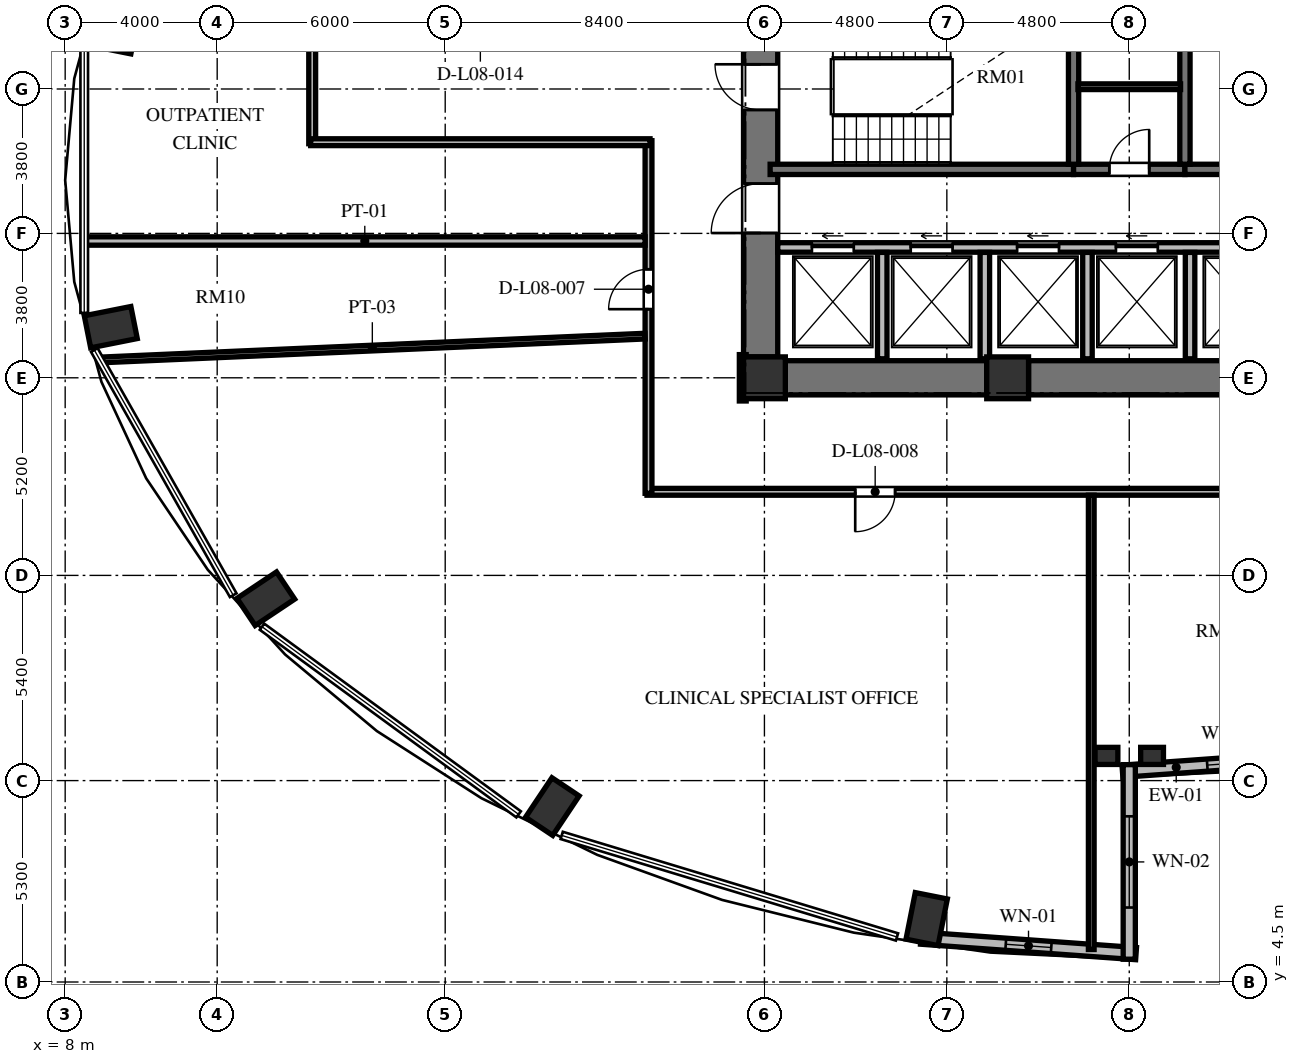
"""IFC4 building model, lengths in metres.
Left out: names, types, materials, properties, quantities, classifications, styles, units other than length and angle.
Written with IfcOpenShell. Run it as: python <this file> out.ifc"""

import sys

from ifc_helpers import new_model, si_unit, direction, frame, frame_2d, origin, origin_2d, place, context, subcontext, project, spatial, rectangle, extrude, element, fill, save


model = new_model("IFC4")
c1 = context("Model", 3, precision=1e-05, world=origin(), true_north=direction((0.0, 1.0)))
c2 = subcontext(c1, "Body", "Model", "MODEL_VIEW")
j1 = project(units=[si_unit("LENGTHUNIT", "METRE"), si_unit("PLANEANGLEUNIT", "RADIAN")], contexts=[c1])
p1 = place(None, origin())
s1 = spatial("IfcSite", under=j1, at=p1, CompositionType="ELEMENT")
p2 = place(p1, origin())
s2 = spatial("IfcBuilding", under=s1, at=p2, CompositionType="ELEMENT")
p3 = place(p2, frame((0.0, 0.0, 36.144)))
s3 = spatial("IfcBuildingStorey", under=s2, at=p3, CompositionType="ELEMENT", Elevation=36.144)
for number, where, z_axis, x_axis in (
    (1, (9.2, 29.468, 0.0), (0.0, 0.0, 1.0), (-0.981, 0.195, 0.0)),
    (2, (9.2, 21.732, 0.0), (0.0, 0.0, 1.0), (-0.981, -0.195, 0.0)),
    (3, (13.28, 14.586, 0.0), (0.0, 0.0, 1.0), (-0.831, -0.556, 0.0)),
    (4, (20.819, 9.116, 0.0), (0.0, 0.0, 1.0), (-0.556, -0.831, 0.0)),
    (5, (30.669, 6.156, 0.0), (0.0, 0.0, 1.0), (-0.195, -0.981, 0.0)),
):
    element("IfcColumn", number, at=place(p3, frame(where, z_axis=z_axis, x_axis=x_axis)), inside=s3, PredefinedType="COLUMN", context=c2, shape_type="SweptSolid", body=[
        extrude(rectangle(XDim=1.25, YDim=0.86, at=origin_2d()), origin(), (0.0, 0.0, 1.0), 3.648),
    ])
for number, where, z_axis, x_axis in (
    (6, (26.4, 20.4, 0.0), (0.0, 0.0, 1.0), (1.0, 0.0, 0.0)),
    (7, (32.8, 20.4, 0.0), (0.0, 0.0, 1.0), (1.0, 0.0, 0.0)),
):
    element("IfcColumn", number, at=place(p3, frame(where, z_axis=z_axis, x_axis=x_axis)), inside=s3, PredefinedType="COLUMN", context=c2, shape_type="SweptSolid", body=[
        extrude(rectangle(XDim=1.1, YDim=1.1, at=origin_2d()), origin(), (0.0, 0.0, 1.0), 3.648),
    ])
for number, where, z_axis, x_axis in (
    (8, (35.4, 10.45, 0.0), (0.0, 0.0, 1.0), (1.0, 0.0, 0.0)),
    (9, (36.6, 10.45, 0.0), (0.0, 0.0, 1.0), (1.0, 0.0, 0.0)),
):
    element("IfcColumn", number, at=place(p3, frame(where, z_axis=z_axis, x_axis=x_axis)), inside=s3, PredefinedType="PILASTER", context=c2, shape_type="SweptSolid", body=[
        extrude(rectangle(XDim=0.6, YDim=0.45, at=origin_2d()), origin(), (0.0, 0.0, 1.0), 3.648),
    ])
p4 = place(p3, frame((26.3, 20.95, 0.0), z_axis=(0.0, 0.0, 1.0), x_axis=(0.0, 1.0, 0.0)))
e10 = element("IfcWall", 10, at=p4, inside=s3, PredefinedType="SHEAR", context=c2, shape_type="SweptSolid", body=[
    extrude(rectangle(XDim=14.1, YDim=0.9, at=frame_2d((7.05, 0.0))), origin(), (0.0, 0.0, 1.0), 3.648),
])
p5 = place(p4, frame((6.5, 0.0, 0.0)))
e11 = element("IfcOpeningElement", 11, at=p5, cuts=e10, PredefinedType="OPENING", context=c2, shape_type="SweptSolid", body=[
    extrude(rectangle(XDim=1.2, YDim=2.15, at=frame_2d((0.6, 1.075))), frame((0.0, 0.46, 0.0), z_axis=(0.0, -1.0, 0.0), x_axis=(1.0, 0.0, 0.0)), (0.0, 0.0, 1.0), 0.92),
])
p6 = place(p4, frame((9.6, 0.0, 0.0)))
e12 = element("IfcOpeningElement", 12, at=p6, cuts=e10, PredefinedType="OPENING", context=c2, shape_type="SweptSolid", body=[
    extrude(rectangle(XDim=1.3, YDim=2.2, at=frame_2d((0.65, 1.1))), frame((0.0, 0.46, 0.0), z_axis=(0.0, -1.0, 0.0), x_axis=(1.0, 0.0, 0.0)), (0.0, 0.0, 1.0), 0.92),
])
p7 = place(p4, frame((3.26, 0.0, 0.0)))
e13 = element("IfcOpeningElement", 13, at=p7, cuts=e10, PredefinedType="OPENING", context=c2, shape_type="SweptSolid", body=[
    extrude(rectangle(XDim=1.3, YDim=2.2, at=frame_2d((0.65, 1.1))), frame((0.0, 0.46, 0.0), z_axis=(0.0, -1.0, 0.0), x_axis=(1.0, 0.0, 0.0)), (0.0, 0.0, 1.0), 0.92),
])
p8 = place(p3, frame((26.95, 20.4, 0.0), z_axis=(0.0, 0.0, 1.0), x_axis=(1.0, 0.0, 0.0)))
e14 = element("IfcWall", 14, at=p8, inside=s3, PredefinedType="SHEAR", context=c2, shape_type="SweptSolid", body=[
    extrude(rectangle(XDim=5.3, YDim=0.9, at=frame_2d((2.65, 0.0))), origin(), (0.0, 0.0, 1.0), 3.648),
])
p9 = place(p3, frame((33.35, 20.4, 0.0), z_axis=(0.0, 0.0, 1.0), x_axis=(1.0, 0.0, 0.0)))
e15 = element("IfcWall", 15, at=p9, inside=s3, PredefinedType="SHEAR", context=c2, shape_type="SweptSolid", body=[
    extrude(rectangle(XDim=5.3, YDim=0.9, at=frame_2d((2.65, 0.0))), origin(), (0.0, 0.0, 1.0), 3.648),
])
p10 = place(p3, frame((35.821, 10.047, 0.0), z_axis=(0.0, 0.0, 1.0), x_axis=(0.997422321809, 0.071754525696, 0.0)))
e16 = element("IfcWall", 16, at=p10, inside=s3, PredefinedType="SOLIDWALL", context=c2, shape_type="SweptSolid", body=[
    extrude(rectangle(XDim=5.675, YDim=0.32, at=frame_2d((2.838, 0.0))), origin(), (0.0, 0.0, 1.0), 3.428),
])
p11 = place(p10, frame((2.238, 0.0, 0.85)))
e17 = element("IfcOpeningElement", 17, at=p11, cuts=e16, PredefinedType="OPENING", context=c2, shape_type="SweptSolid", body=[
    extrude(rectangle(XDim=1.2, YDim=1.8, at=frame_2d((0.6, 0.9))), frame((0.0, 0.17, 0.0), z_axis=(0.0, -1.0, 0.0), x_axis=(1.0, 0.0, 0.0)), (0.0, 0.0, 1.0), 0.34),
])
p12 = place(p3, frame((30.519, 5.654, 0.0), z_axis=(0.0, 0.0, 1.0), x_axis=(0.997421878774, -0.071760683825, 0.0)))
e18 = element("IfcWall", 18, at=p12, inside=s3, PredefinedType="SOLIDWALL", context=c2, shape_type="SweptSolid", body=[
    extrude(rectangle(XDim=5.675, YDim=0.32, at=frame_2d((2.837, 0.0))), origin(), (0.0, 0.0, 1.0), 3.428),
])
p13 = place(p12, frame((2.237, 0.0, 0.85)))
e19 = element("IfcOpeningElement", 19, at=p13, cuts=e18, PredefinedType="OPENING", context=c2, shape_type="SweptSolid", body=[
    extrude(rectangle(XDim=1.2, YDim=2.2, at=frame_2d((0.6, 1.1))), frame((0.0, 0.17, 0.0), z_axis=(0.0, -1.0, 0.0), x_axis=(1.0, 0.0, 0.0)), (0.0, 0.0, 1.0), 0.34),
])
p14 = place(p3, frame((36.0, 5.1, 0.0), z_axis=(0.0, 0.0, 1.0), x_axis=(0.0, 1.0, 0.0)))
e20 = element("IfcWall", 20, at=p14, inside=s3, PredefinedType="SOLIDWALL", context=c2, shape_type="SweptSolid", body=[
    extrude(rectangle(XDim=5.12, YDim=0.32, at=frame_2d((2.56, 0.0))), origin(), (0.0, 0.0, 1.0), 3.428),
])
p15 = place(p14, frame((1.36, 0.0, 0.84)))
e21 = element("IfcOpeningElement", 21, at=p15, cuts=e20, PredefinedType="OPENING", context=c2, shape_type="SweptSolid", body=[
    extrude(rectangle(XDim=2.4, YDim=2.04, at=frame_2d((1.2, 1.02))), frame((0.0, 0.17, 0.0), z_axis=(0.0, -1.0, 0.0), x_axis=(1.0, 0.0, 0.0)), (0.0, 0.0, 1.0), 0.34),
])
p16 = place(p3, frame((26.55, 25.885, 0.0), z_axis=(0.0, 0.0, 1.0), x_axis=(1.0, 0.0, 0.0)))
e22 = element("IfcWall", 22, at=p16, inside=s3, PredefinedType="SHEAR", context=c2, shape_type="SweptSolid", body=[
    extrude(rectangle(XDim=7.985, YDim=0.27, at=frame_2d((3.992, 0.0))), origin(), (0.0, 0.0, 1.0), 3.648),
])
p17 = place(p3, frame((34.535, 25.885, 0.0), z_axis=(0.0, 0.0, 1.0), x_axis=(1.0, 0.0, 0.0)))
e23 = element("IfcWall", 23, at=p17, inside=s3, PredefinedType="SHEAR", context=c2, shape_type="SweptSolid", body=[
    extrude(rectangle(XDim=2.93, YDim=0.27, at=frame_2d((1.465, 0.0))), origin(), (0.0, 0.0, 1.0), 3.648),
])
p18 = place(p17, frame((0.94, 0.0, 0.0)))
e24 = element("IfcOpeningElement", 24, at=p18, cuts=e23, PredefinedType="OPENING", context=c2, shape_type="SweptSolid", body=[
    extrude(rectangle(XDim=1.05, YDim=2.15, at=frame_2d((0.525, 1.075))), frame((0.0, 0.145, 0.0), z_axis=(0.0, -1.0, 0.0), x_axis=(1.0, 0.0, 0.0)), (0.0, 0.0, 1.0), 0.29),
])
p19 = place(p3, frame((37.465, 25.885, 0.0), z_axis=(0.0, 0.0, 1.0), x_axis=(1.0, 0.0, 0.0)))
e25 = element("IfcWall", 25, at=p19, inside=s3, PredefinedType="SHEAR", context=c2, shape_type="SweptSolid", body=[
    extrude(rectangle(XDim=7.985, YDim=0.27, at=frame_2d((3.992, 0.0))), origin(), (0.0, 0.0, 1.0), 3.648),
])
for number, where, z_axis, x_axis in (
    (26, (34.535, 26.02, 0.0), (0.0, 0.0, 1.0), (0.0, 1.0, 0.0)),
    (27, (37.465, 26.02, 0.0), (0.0, 0.0, 1.0), (0.0, 1.0, 0.0)),
):
    element("IfcWall", number, at=place(p3, frame(where, z_axis=z_axis, x_axis=x_axis)), inside=s3, PredefinedType="SHEAR", context=c2, shape_type="SweptSolid", body=[
        extrude(rectangle(XDim=4.08, YDim=0.27, at=frame_2d((2.04, 0.0))), origin(), (0.0, 0.0, 1.0), 3.648),
    ])
p20 = place(p3, frame((34.65, 28.06, 0.0), z_axis=(0.0, 0.0, 1.0), x_axis=(1.0, 0.0, 0.0)))
e28 = element("IfcWall", 28, at=p20, inside=s3, PredefinedType="PARTITIONING", context=c2, shape_type="SweptSolid", body=[
    extrude(rectangle(XDim=2.7, YDim=0.15, at=frame_2d((1.35, 0.0))), origin(), (0.0, 0.0, 1.0), 3.428),
])
p21 = place(p3, frame((26.75, 23.83, 0.0), z_axis=(0.0, 0.0, 1.0), x_axis=(1.0, 0.0, 0.0)))
e29 = element("IfcWall", 29, at=p21, inside=s3, PredefinedType="SOLIDWALL", context=c2, shape_type="SweptSolid", body=[
    extrude(rectangle(XDim=16.2, YDim=0.25, at=frame_2d((8.1, 0.0))), origin(), (0.0, 0.0, 1.0), 3.428),
])
p22 = place(p21, frame((0.9, 0.0, 0.0)))
e30 = element("IfcOpeningElement", 30, at=p22, cuts=e29, PredefinedType="OPENING", context=c2, shape_type="SweptSolid", body=[
    extrude(rectangle(XDim=1.1, YDim=2.2, at=frame_2d((0.55, 1.1))), frame((0.0, 0.135, 0.0), z_axis=(0.0, -1.0, 0.0), x_axis=(1.0, 0.0, 0.0)), (0.0, 0.0, 1.0), 0.27),
])
p23 = place(p21, frame((3.5, 0.0, 0.0)))
e31 = element("IfcOpeningElement", 31, at=p23, cuts=e29, PredefinedType="OPENING", context=c2, shape_type="SweptSolid", body=[
    extrude(rectangle(XDim=1.1, YDim=2.2, at=frame_2d((0.55, 1.1))), frame((0.0, 0.135, 0.0), z_axis=(0.0, -1.0, 0.0), x_axis=(1.0, 0.0, 0.0)), (0.0, 0.0, 1.0), 0.27),
])
p24 = place(p21, frame((6.3, 0.0, 0.0)))
e32 = element("IfcOpeningElement", 32, at=p24, cuts=e29, PredefinedType="OPENING", context=c2, shape_type="SweptSolid", body=[
    extrude(rectangle(XDim=1.1, YDim=2.2, at=frame_2d((0.55, 1.1))), frame((0.0, 0.135, 0.0), z_axis=(0.0, -1.0, 0.0), x_axis=(1.0, 0.0, 0.0)), (0.0, 0.0, 1.0), 0.27),
])
p25 = place(p21, frame((8.9, 0.0, 0.0)))
e33 = element("IfcOpeningElement", 33, at=p25, cuts=e29, PredefinedType="OPENING", context=c2, shape_type="SweptSolid", body=[
    extrude(rectangle(XDim=1.1, YDim=2.2, at=frame_2d((0.55, 1.1))), frame((0.0, 0.135, 0.0), z_axis=(0.0, -1.0, 0.0), x_axis=(1.0, 0.0, 0.0)), (0.0, 0.0, 1.0), 0.27),
])
p26 = place(p21, frame((11.7, 0.0, 0.0)))
e34 = element("IfcOpeningElement", 34, at=p26, cuts=e29, PredefinedType="OPENING", context=c2, shape_type="SweptSolid", body=[
    extrude(rectangle(XDim=1.1, YDim=2.2, at=frame_2d((0.55, 1.1))), frame((0.0, 0.135, 0.0), z_axis=(0.0, -1.0, 0.0), x_axis=(1.0, 0.0, 0.0)), (0.0, 0.0, 1.0), 0.27),
])
p27 = place(p21, frame((14.15, 0.0, 0.0)))
e35 = element("IfcOpeningElement", 35, at=p27, cuts=e29, PredefinedType="OPENING", context=c2, shape_type="SweptSolid", body=[
    extrude(rectangle(XDim=1.4, YDim=2.3, at=frame_2d((0.7, 1.15))), frame((0.0, 0.135, 0.0), z_axis=(0.0, -1.0, 0.0), x_axis=(1.0, 0.0, 0.0)), (0.0, 0.0, 1.0), 0.27),
])
for number, where, z_axis, x_axis in (
    (36, (29.5, 20.9, 0.0), (0.0, 0.0, 1.0), (0.0, 1.0, 0.0)),
    (37, (32.2, 20.9, 0.0), (0.0, 0.0, 1.0), (0.0, 1.0, 0.0)),
    (38, (34.9, 20.9, 0.0), (0.0, 0.0, 1.0), (0.0, 1.0, 0.0)),
    (39, (37.6, 20.9, 0.0), (0.0, 0.0, 1.0), (0.0, 1.0, 0.0)),
):
    element("IfcWall", number, at=place(p3, frame(where, z_axis=z_axis, x_axis=x_axis)), inside=s3, PredefinedType="SOLIDWALL", context=c2, shape_type="SweptSolid", body=[
        extrude(rectangle(XDim=2.8, YDim=0.25, at=frame_2d((1.4, 0.0))), origin(), (0.0, 0.0, 1.0), 3.428),
    ])
p28 = place(p3, frame((14.5, 26.56, 0.0), z_axis=(0.0, 0.0, 1.0), x_axis=(0.0, 1.0, 0.0)))
e40 = element("IfcWall", 40, at=p28, inside=s3, PredefinedType="PARTITIONING", context=c2, shape_type="SweptSolid", body=[
    extrude(rectangle(XDim=2.88, YDim=0.18, at=frame_2d((1.44, 0.0))), origin(), (0.0, 0.0, 1.0), 3.428),
])
p29 = place(p3, frame((25.83, 21.01, 0.0), z_axis=(0.0, 0.0, 1.0), x_axis=(0.0, -1.0, 0.0)))
e41 = element("IfcWall", 41, at=p29, inside=s3, PredefinedType="PARTITIONING", context=c2, shape_type="SweptSolid", body=[
    extrude(rectangle(XDim=1.22, YDim=0.18, at=frame_2d((0.61, 0.0))), origin(), (0.0, 0.0, 1.0), 3.428),
])
p30 = place(p3, frame((45.24, 17.4, 0.0), z_axis=(0.0, 0.0, 1.0), x_axis=(-1.0, 0.0, 0.0)))
e42 = element("IfcWall", 42, at=p30, inside=s3, PredefinedType="PARTITIONING", context=c2, shape_type="SweptSolid", body=[
    extrude(rectangle(XDim=21.93, YDim=0.18, at=frame_2d((10.965, 0.0))), origin(), (0.0, 0.0, 1.0), 3.053),
])
p31 = place(p30, frame((15.401, 0.0, 0.0)))
e43 = element("IfcOpeningElement", 43, at=p31, cuts=e42, PredefinedType="OPENING", context=c2, shape_type="SweptSolid", body=[
    extrude(rectangle(XDim=1.05, YDim=2.15, at=frame_2d((0.525, 1.075))), frame((0.0, 0.1, 0.0), z_axis=(0.0, -1.0, 0.0), x_axis=(1.0, 0.0, 0.0)), (0.0, 0.0, 1.0), 0.2),
])
p32 = place(p30, frame((4.754, 0.0, 0.0)))
e44 = element("IfcOpeningElement", 44, at=p32, cuts=e42, PredefinedType="OPENING", context=c2, shape_type="SweptSolid", body=[
    extrude(rectangle(XDim=1.05, YDim=2.15, at=frame_2d((0.525, 1.075))), frame((0.0, 0.1, 0.0), z_axis=(0.0, -1.0, 0.0), x_axis=(1.0, 0.0, 0.0)), (0.0, 0.0, 1.0), 0.2),
])
p33 = place(p3, frame((23.35, 17.36, 0.0), z_axis=(0.0, 0.0, 1.0), x_axis=(0.0, 1.0, 0.0)))
e45 = element("IfcWall", 45, at=p33, inside=s3, PredefinedType="PARTITIONING", context=c2, shape_type="SweptSolid", body=[
    extrude(rectangle(XDim=9.28, YDim=0.18, at=frame_2d((4.64, 0.0))), origin(), (0.0, 0.0, 1.0), 3.428),
])
p34 = place(p33, frame((4.846, 0.0, 0.0)))
e46 = element("IfcOpeningElement", 46, at=p34, cuts=e45, PredefinedType="OPENING", context=c2, shape_type="SweptSolid", body=[
    extrude(rectangle(XDim=1.05, YDim=2.15, at=frame_2d((0.525, 1.075))), frame((0.0, 0.1, 0.0), z_axis=(0.0, -1.0, 0.0), x_axis=(1.0, 0.0, 0.0)), (0.0, 0.0, 1.0), 0.2),
])
p35 = place(p3, frame((23.39, 26.6, 0.0), z_axis=(0.0, 0.0, 1.0), x_axis=(-1.0, 0.0, 0.0)))
e47 = element("IfcWall", 47, at=p35, inside=s3, PredefinedType="PARTITIONING", context=c2, shape_type="SweptSolid", body=[
    extrude(rectangle(XDim=8.93, YDim=0.18, at=frame_2d((4.465, 0.0))), origin(), (0.0, 0.0, 1.0), 3.428),
])
p36 = place(p3, frame((8.905, 20.868, 0.0), z_axis=(0.0, 0.0, 1.0), x_axis=(0.999043936959, 0.043717411007, 0.0)))
e48 = element("IfcWall", 48, at=p36, inside=s3, PredefinedType="PARTITIONING", context=c2, shape_type="SweptSolid", body=[
    extrude(rectangle(XDim=14.369, YDim=0.15, at=frame_2d((7.185, 0.0))), origin(), (0.0, 0.0, 1.0), 2.813),
])
p37 = place(p3, frame((8.508, 24.0, 0.0), z_axis=(0.0, 0.0, 1.0), x_axis=(1.0, 0.0, 0.0)))
e49 = element("IfcWall", 49, at=p37, inside=s3, PredefinedType="PARTITIONING", context=c2, shape_type="SweptSolid", body=[
    extrude(rectangle(XDim=14.752, YDim=0.22, at=frame_2d((7.376, 0.0))), origin(), (0.0, 0.0, 1.0), 3.428),
])
p38 = place(p3, frame((35.0, 5.356, 0.0), z_axis=(0.0, 0.0, 1.0), x_axis=(0.0, 1.0, 0.0)))
e50 = element("IfcWall", 50, at=p38, inside=s3, PredefinedType="PARTITIONING", context=c2, shape_type="SweptSolid", body=[
    extrude(rectangle(XDim=11.954, YDim=0.15, at=frame_2d((5.977, 0.0))), origin(), (0.0, 0.0, 1.0), 3.428),
])
p39 = place(p11, origin())
e51 = element("IfcWindow", 51, at=p39, inside=s3, PartitioningType="SINGLE_PANEL", PredefinedType="WINDOW", context=c2, shape_type="SweptSolid", body=[
    extrude(rectangle(XDim=1.2, YDim=1.8, at=frame_2d((0.6, 0.9))), frame((0.0, 0.03, 0.0), z_axis=(0.0, -1.0, 0.0), x_axis=(1.0, 0.0, 0.0)), (0.0, 0.0, 1.0), 0.06),
])
fill(e17, e51)
p40 = place(p13, origin())
e52 = element("IfcWindow", 52, at=p40, inside=s3, PartitioningType="SINGLE_PANEL", PredefinedType="WINDOW", context=c2, shape_type="SweptSolid", body=[
    extrude(rectangle(XDim=1.2, YDim=2.2, at=frame_2d((0.6, 1.1))), frame((0.0, 0.03, 0.0), z_axis=(0.0, -1.0, 0.0), x_axis=(1.0, 0.0, 0.0)), (0.0, 0.0, 1.0), 0.06),
])
fill(e19, e52)
p41 = place(p15, origin())
e53 = element("IfcWindow", 53, at=p41, inside=s3, PartitioningType="SINGLE_PANEL", PredefinedType="WINDOW", context=c2, shape_type="SweptSolid", body=[
    extrude(rectangle(XDim=2.4, YDim=2.04, at=frame_2d((1.2, 1.02))), frame((0.0, 0.03, 0.0), z_axis=(0.0, -1.0, 0.0), x_axis=(1.0, 0.0, 0.0)), (0.0, 0.0, 1.0), 0.06),
])
fill(e21, e53)
p42 = place(p5, origin())
e54 = element("IfcDoor", 54, at=p42, inside=s3, OperationType="SINGLE_SWING_RIGHT", PredefinedType="DOOR", context=c2, shape_type="SweptSolid", body=[
    extrude(rectangle(XDim=1.2, YDim=2.15, at=frame_2d((0.6, 1.075))), frame((0.0, 0.025, 0.0), z_axis=(0.0, -1.0, 0.0), x_axis=(1.0, 0.0, 0.0)), (0.0, 0.0, 1.0), 0.05),
])
fill(e11, e54)
p43 = place(p18, origin())
e55 = element("IfcDoor", 55, at=p43, inside=s3, OperationType="SINGLE_SWING_RIGHT", PredefinedType="DOOR", context=c2, shape_type="SweptSolid", body=[
    extrude(rectangle(XDim=1.05, YDim=2.15, at=frame_2d((0.525, 1.075))), frame((0.0, 0.025, 0.0), z_axis=(0.0, -1.0, 0.0), x_axis=(1.0, 0.0, 0.0)), (0.0, 0.0, 1.0), 0.05),
])
fill(e24, e55)
p44 = place(p7, origin())
e56 = element("IfcDoor", 56, at=p44, inside=s3, OperationType="SINGLE_SWING_LEFT", PredefinedType="DOOR", context=c2, shape_type="SweptSolid", body=[
    extrude(rectangle(XDim=1.3, YDim=2.2, at=frame_2d((0.65, 1.1))), frame((0.0, 0.025, 0.0), z_axis=(0.0, -1.0, 0.0), x_axis=(1.0, 0.0, 0.0)), (0.0, 0.0, 1.0), 0.05),
])
fill(e13, e56)
p45 = place(p22, origin())
e57 = element("IfcDoor", 57, at=p45, inside=s3, OperationType="SLIDING_TO_LEFT", PredefinedType="DOOR", context=c2, shape_type="SweptSolid", body=[
    extrude(rectangle(XDim=1.1, YDim=2.2, at=frame_2d((0.55, 1.1))), frame((0.0, 0.025, 0.0), z_axis=(0.0, -1.0, 0.0), x_axis=(1.0, 0.0, 0.0)), (0.0, 0.0, 1.0), 0.05),
])
fill(e30, e57)
p46 = place(p23, origin())
e58 = element("IfcDoor", 58, at=p46, inside=s3, OperationType="SLIDING_TO_LEFT", PredefinedType="DOOR", context=c2, shape_type="SweptSolid", body=[
    extrude(rectangle(XDim=1.1, YDim=2.2, at=frame_2d((0.55, 1.1))), frame((0.0, 0.025, 0.0), z_axis=(0.0, -1.0, 0.0), x_axis=(1.0, 0.0, 0.0)), (0.0, 0.0, 1.0), 0.05),
])
fill(e31, e58)
p47 = place(p24, origin())
e59 = element("IfcDoor", 59, at=p47, inside=s3, OperationType="SLIDING_TO_LEFT", PredefinedType="DOOR", context=c2, shape_type="SweptSolid", body=[
    extrude(rectangle(XDim=1.1, YDim=2.2, at=frame_2d((0.55, 1.1))), frame((0.0, 0.025, 0.0), z_axis=(0.0, -1.0, 0.0), x_axis=(1.0, 0.0, 0.0)), (0.0, 0.0, 1.0), 0.05),
])
fill(e32, e59)
p48 = place(p25, origin())
e60 = element("IfcDoor", 60, at=p48, inside=s3, OperationType="SLIDING_TO_LEFT", PredefinedType="DOOR", context=c2, shape_type="SweptSolid", body=[
    extrude(rectangle(XDim=1.1, YDim=2.2, at=frame_2d((0.55, 1.1))), frame((0.0, 0.025, 0.0), z_axis=(0.0, -1.0, 0.0), x_axis=(1.0, 0.0, 0.0)), (0.0, 0.0, 1.0), 0.05),
])
fill(e33, e60)
p49 = place(p34, origin())
e61 = element("IfcDoor", 61, at=p49, inside=s3, OperationType="SINGLE_SWING_LEFT", PredefinedType="DOOR", context=c2, shape_type="SweptSolid", body=[
    extrude(rectangle(XDim=1.05, YDim=2.15, at=frame_2d((0.525, 1.075))), frame((0.0, 0.025, 0.0), z_axis=(0.0, -1.0, 0.0), x_axis=(1.0, 0.0, 0.0)), (0.0, 0.0, 1.0), 0.05),
])
fill(e46, e61)
p50 = place(p31, origin())
e62 = element("IfcDoor", 62, at=p50, inside=s3, OperationType="SINGLE_SWING_RIGHT", PredefinedType="DOOR", context=c2, shape_type="SweptSolid", body=[
    extrude(rectangle(XDim=1.05, YDim=2.15, at=frame_2d((0.525, 1.075))), frame((0.0, 0.025, 0.0), z_axis=(0.0, -1.0, 0.0), x_axis=(1.0, 0.0, 0.0)), (0.0, 0.0, 1.0), 0.05),
])
fill(e43, e62)
save(model, sys.argv[1])
